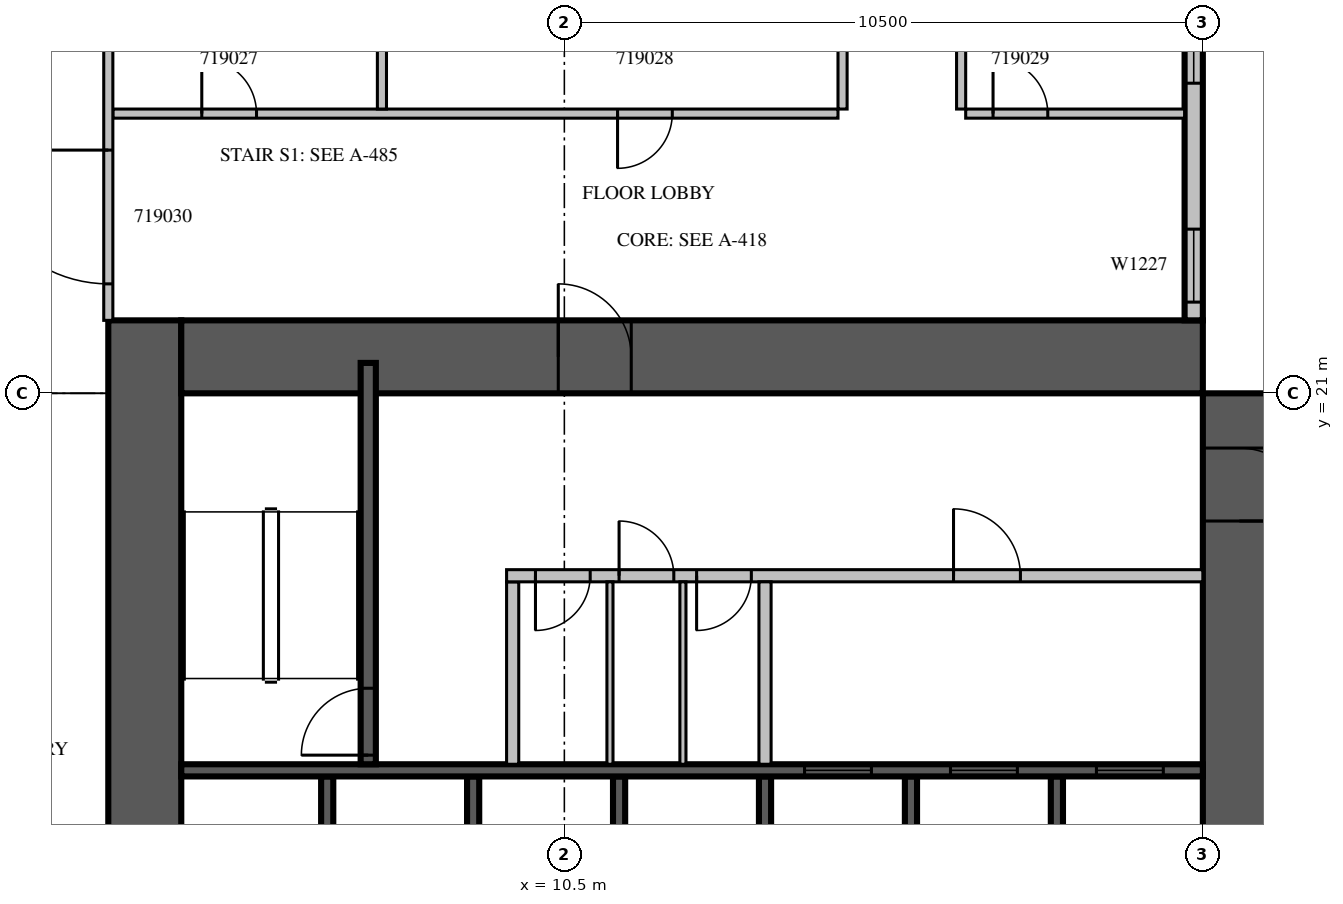
"""IFC4 building model, lengths in metres.
Left out: names, types, materials, properties, quantities, classifications, styles, units other than length and angle.
Written with IfcOpenShell. Run it as: python <this file> out.ifc"""

import sys

from ifc_helpers import new_model, si_unit, direction, frame, frame_2d, origin, place, context, subcontext, project, spatial, rectangle, extrude, source, transform, mapped, element, fill, save


model = new_model("IFC4")
c1 = context("Model", 3, precision=1e-05, world=origin(), true_north=direction((0.0, 1.0)))
c2 = subcontext(c1, "Body", "Model", "MODEL_VIEW")
j1 = project(units=[si_unit("LENGTHUNIT", "METRE"), si_unit("PLANEANGLEUNIT", "RADIAN")], contexts=[c1])
p1 = place(None, origin())
s1 = spatial("IfcSite", under=j1, at=p1, CompositionType="ELEMENT")
p2 = place(p1, origin())
s2 = spatial("IfcBuilding", under=s1, at=p2, CompositionType="ELEMENT")
p3 = place(p2, frame((0.0, 0.0, 90.9)))
s3 = spatial("IfcBuildingStorey", under=s2, at=p3, CompositionType="ELEMENT", Elevation=90.9)
m1 = source(origin(), c2, "Body", "SweptSolid", [
    extrude(rectangle(XDim=18.0, YDim=1.2, at=frame_2d((9.0, 0.0))), origin(), (0.0, 0.0, 1.0), 4.2),
])
p4 = place(p3, frame((3.6, 4.2, 0.0), z_axis=(0.0, 0.0, 1.0), x_axis=(0.0, 1.0, 0.0)))
e1 = element("IfcWall", 1, at=p4, inside=s3, PredefinedType="SHEAR", context=c2, shape_type="MappedRepresentation", body=[
    mapped(m1, transform((0.0, 0.0, 0.0), scale=1.0)),
])
m2 = source(origin(), c2, "Body", "SweptSolid", [
    extrude(rectangle(XDim=2.2, YDim=2.1, at=frame_2d((1.1, 1.05))), frame((0.0, 0.61, 0.0), z_axis=(0.0, -1.0, 0.0), x_axis=(1.0, 0.0, 0.0)), (0.0, 0.0, 1.0), 1.22),
])
p5 = place(p4, frame((4.2, 0.0, 0.0)))
e2 = element("IfcOpeningElement", 2, at=p5, cuts=e1, PredefinedType="OPENING", context=c2, shape_type="MappedRepresentation", body=[
    mapped(m2, transform((0.0, 0.0, 0.0), scale=1.0)),
])
m3 = source(origin(), c2, "Body", "SweptSolid", [
    extrude(rectangle(XDim=16.8, YDim=1.2, at=frame_2d((8.4, 0.0))), origin(), (0.0, 0.0, 1.0), 4.2),
])
p6 = place(p3, frame((21.6, 4.2, 0.0), z_axis=(0.0, 0.0, 1.0), x_axis=(0.0, 1.0, 0.0)))
e3 = element("IfcWall", 3, at=p6, inside=s3, PredefinedType="SHEAR", context=c2, shape_type="MappedRepresentation", body=[
    mapped(m3, transform((0.0, 0.0, 0.0), scale=1.0)),
])
p7 = place(p6, frame((4.2, 0.0, 0.0)))
e4 = element("IfcOpeningElement", 4, at=p7, cuts=e3, PredefinedType="OPENING", context=c2, shape_type="MappedRepresentation", body=[
    mapped(m2, transform((0.0, 0.0, 0.0), scale=1.0)),
])
m4 = source(origin(), c2, "Body", "SweptSolid", [
    extrude(rectangle(XDim=1.2, YDim=2.1, at=frame_2d((0.6, 1.05))), frame((0.0, 0.61, 0.0), z_axis=(0.0, -1.0, 0.0), x_axis=(1.0, 0.0, 0.0)), (0.0, 0.0, 1.0), 1.22),
])
p8 = place(p6, frame((14.7, 0.0, 0.0)))
e5 = element("IfcOpeningElement", 5, at=p8, cuts=e3, PredefinedType="OPENING", context=c2, shape_type="MappedRepresentation", body=[
    mapped(m4, transform((0.0, 0.0, 0.0), scale=1.0)),
])
p9 = place(p3, frame((4.2, 21.6, 0.0), z_axis=(0.0, 0.0, 1.0), x_axis=(1.0, 0.0, 0.0)))
e6 = element("IfcWall", 6, at=p9, inside=s3, PredefinedType="SHEAR", context=c2, shape_type="MappedRepresentation", body=[
    mapped(m3, transform((0.0, 0.0, 0.0), scale=1.0)),
])
p10 = place(p9, frame((6.2, 0.0, 0.0)))
e7 = element("IfcOpeningElement", 7, at=p10, cuts=e6, PredefinedType="OPENING", context=c2, shape_type="MappedRepresentation", body=[
    mapped(m4, transform((0.0, 0.0, 0.0), scale=1.0)),
])
m5 = source(origin(), c2, "Body", "SweptSolid", [
    extrude(rectangle(XDim=6.6, YDim=0.3, at=frame_2d((3.3, 0.0))), origin(), (0.0, 0.0, 1.0), 3.8),
])
p11 = place(p3, frame((20.85, 22.2, 0.0), z_axis=(0.0, 0.0, 1.0), x_axis=(0.0, 1.0, 0.0)))
e8 = element("IfcWall", 8, at=p11, inside=s3, PredefinedType="STANDARD", context=c2, shape_type="MappedRepresentation", body=[
    mapped(m5, transform((0.0, 0.0, 0.0), scale=1.0)),
])
m6 = source(origin(), c2, "Body", "SweptSolid", [
    extrude(rectangle(XDim=1.2, YDim=2.7, at=frame_2d((0.6, 1.35))), frame((0.0, 0.16, 0.0), z_axis=(0.0, -1.0, 0.0), x_axis=(1.0, 0.0, 0.0)), (0.0, 0.0, 1.0), 0.32),
])
p12 = place(p11, frame((0.3, 0.0, 0.6)))
e9 = element("IfcOpeningElement", 9, at=p12, cuts=e8, PredefinedType="OPENING", context=c2, shape_type="MappedRepresentation", body=[
    mapped(m6, transform((0.0, 0.0, 0.0), scale=1.0)),
])
m7 = source(origin(), c2, "Body", "SweptSolid", [
    extrude(rectangle(XDim=2.4, YDim=2.7, at=frame_2d((1.2, 1.35))), frame((0.0, 0.16, 0.0), z_axis=(0.0, -1.0, 0.0), x_axis=(1.0, 0.0, 0.0)), (0.0, 0.0, 1.0), 0.32),
])
p13 = place(p11, frame((3.9, 0.0, 0.6)))
e10 = element("IfcOpeningElement", 10, at=p13, cuts=e8, PredefinedType="OPENING", context=c2, shape_type="MappedRepresentation", body=[
    mapped(m7, transform((0.0, 0.0, 0.0), scale=1.0)),
])
m8 = source(origin(), c2, "Body", "SweptSolid", [
    extrude(rectangle(XDim=3.0, YDim=0.2, at=frame_2d((1.5, 0.0))), origin(), (0.0, 0.0, 1.0), 4.2),
])
for number, where, z_axis, x_axis in (
    (11, (6.6, 11.7, 0.0), (0.0, 0.0, 1.0), (0.0, 1.0, 0.0)),
    (12, (9.0, 11.7, 0.0), (0.0, 0.0, 1.0), (0.0, 1.0, 0.0)),
    (13, (11.4, 11.7, 0.0), (0.0, 0.0, 1.0), (0.0, 1.0, 0.0)),
    (14, (13.8, 11.7, 0.0), (0.0, 0.0, 1.0), (0.0, 1.0, 0.0)),
    (15, (16.2, 11.7, 0.0), (0.0, 0.0, 1.0), (0.0, 1.0, 0.0)),
    (16, (18.6, 11.7, 0.0), (0.0, 0.0, 1.0), (0.0, 1.0, 0.0)),
):
    element("IfcWall", number, at=place(p3, frame(where, z_axis=z_axis, x_axis=x_axis)), inside=s3, PredefinedType="SOLIDWALL", context=c2, shape_type="MappedRepresentation", body=[
        mapped(m8, transform((0.0, 0.0, 0.0), scale=1.0)),
    ])
m9 = source(origin(), c2, "Body", "SweptSolid", [
    extrude(rectangle(XDim=16.8, YDim=0.2, at=frame_2d((8.4, 0.0))), origin(), (0.0, 0.0, 1.0), 4.2),
])
p14 = place(p3, frame((4.2, 14.8, 0.0), z_axis=(0.0, 0.0, 1.0), x_axis=(1.0, 0.0, 0.0)))
e17 = element("IfcWall", 17, at=p14, inside=s3, PredefinedType="SOLIDWALL", context=c2, shape_type="MappedRepresentation", body=[
    mapped(m9, transform((0.0, 0.0, 0.0), scale=1.0)),
])
m10 = source(origin(), c2, "Body", "SweptSolid", [
    extrude(rectangle(XDim=1.1, YDim=2.1, at=frame_2d((0.55, 1.05))), frame((0.0, 0.11, 0.0), z_axis=(0.0, -1.0, 0.0), x_axis=(1.0, 0.0, 0.0)), (0.0, 0.0, 1.0), 0.22),
])
p15 = place(p14, frame((10.25, 0.0, 0.0)))
e18 = element("IfcOpeningElement", 18, at=p15, cuts=e17, PredefinedType="OPENING", context=c2, shape_type="MappedRepresentation", body=[
    mapped(m10, transform((0.0, 0.0, 0.0), scale=1.0)),
])
p16 = place(p14, frame((12.65, 0.0, 0.0)))
e19 = element("IfcOpeningElement", 19, at=p16, cuts=e17, PredefinedType="OPENING", context=c2, shape_type="MappedRepresentation", body=[
    mapped(m10, transform((0.0, 0.0, 0.0), scale=1.0)),
])
p17 = place(p14, frame((15.05, 0.0, 0.0)))
e20 = element("IfcOpeningElement", 20, at=p17, cuts=e17, PredefinedType="OPENING", context=c2, shape_type="MappedRepresentation", body=[
    mapped(m10, transform((0.0, 0.0, 0.0), scale=1.0)),
])
m11 = source(origin(), c2, "Body", "SweptSolid", [
    extrude(rectangle(XDim=6.6, YDim=0.25, at=frame_2d((3.3, 0.0))), origin(), (0.0, 0.0, 1.0), 3.8),
])
p18 = place(p3, frame((7.275, 14.9, 0.0), z_axis=(0.0, 0.0, 1.0), x_axis=(0.0, 1.0, 0.0)))
e21 = element("IfcWall", 21, at=p18, inside=s3, PredefinedType="SOLIDWALL", context=c2, shape_type="MappedRepresentation", body=[
    mapped(m11, transform((0.0, 0.0, 0.0), scale=1.0)),
])
m12 = source(origin(), c2, "Body", "SweptSolid", [
    extrude(rectangle(XDim=1.1, YDim=2.1, at=frame_2d((0.55, 1.05))), frame((0.0, 0.135, 0.0), z_axis=(0.0, -1.0, 0.0), x_axis=(1.0, 0.0, 0.0)), (0.0, 0.0, 1.0), 0.27),
])
p19 = place(p18, frame((0.15, 0.0, 0.0)))
e22 = element("IfcOpeningElement", 22, at=p19, cuts=e21, PredefinedType="OPENING", context=c2, shape_type="MappedRepresentation", body=[
    mapped(m12, transform((0.0, 0.0, 0.0), scale=1.0)),
])
m13 = source(origin(), c2, "Body", "SweptSolid", [
    extrude(rectangle(XDim=3.0, YDim=0.2, at=frame_2d((1.5, 0.0))), origin(), (0.0, 0.0, 1.0), 3.8),
])
p20 = place(p3, frame((9.65, 14.9, 0.0), z_axis=(0.0, 0.0, 1.0), x_axis=(0.0, 1.0, 0.0)))
e23 = element("IfcWall", 23, at=p20, inside=s3, PredefinedType="PARTITIONING", context=c2, shape_type="MappedRepresentation", body=[
    mapped(m13, transform((0.0, 0.0, 0.0), scale=1.0)),
])
m14 = source(origin(), c2, "Body", "SweptSolid", [
    extrude(rectangle(XDim=11.45, YDim=0.2, at=frame_2d((5.725, 0.0))), origin(), (0.0, 0.0, 1.0), 3.8),
])
p21 = place(p3, frame((9.55, 18.0, 0.0), z_axis=(0.0, 0.0, 1.0), x_axis=(1.0, 0.0, 0.0)))
e24 = element("IfcWall", 24, at=p21, inside=s3, PredefinedType="PARTITIONING", context=c2, shape_type="MappedRepresentation", body=[
    mapped(m14, transform((0.0, 0.0, 0.0), scale=1.0)),
])
m15 = source(origin(), c2, "Body", "SweptSolid", [
    extrude(rectangle(XDim=0.9, YDim=2.1, at=frame_2d((0.45, 1.05))), frame((0.0, 0.11, 0.0), z_axis=(0.0, -1.0, 0.0), x_axis=(1.0, 0.0, 0.0)), (0.0, 0.0, 1.0), 0.22),
])
p22 = place(p21, frame((0.475, 0.0, 0.0)))
e25 = element("IfcOpeningElement", 25, at=p22, cuts=e24, PredefinedType="OPENING", context=c2, shape_type="MappedRepresentation", body=[
    mapped(m15, transform((0.0, 0.0, 0.0), scale=1.0)),
])
p23 = place(p21, frame((1.85, 0.0, 0.0)))
e26 = element("IfcOpeningElement", 26, at=p23, cuts=e24, PredefinedType="OPENING", context=c2, shape_type="MappedRepresentation", body=[
    mapped(m15, transform((0.0, 0.0, 0.0), scale=1.0)),
])
p24 = place(p21, frame((3.125, 0.0, 0.0)))
e27 = element("IfcOpeningElement", 27, at=p24, cuts=e24, PredefinedType="OPENING", context=c2, shape_type="MappedRepresentation", body=[
    mapped(m15, transform((0.0, 0.0, 0.0), scale=1.0)),
])
p25 = place(p21, frame((7.35, 0.0, 0.0)))
e28 = element("IfcOpeningElement", 28, at=p25, cuts=e24, PredefinedType="OPENING", context=c2, shape_type="MappedRepresentation", body=[
    mapped(m10, transform((0.0, 0.0, 0.0), scale=1.0)),
])
p26 = place(p3, frame((13.8, 14.9, 0.0), z_axis=(0.0, 0.0, 1.0), x_axis=(0.0, 1.0, 0.0)))
e29 = element("IfcWall", 29, at=p26, inside=s3, PredefinedType="PARTITIONING", context=c2, shape_type="MappedRepresentation", body=[
    mapped(m13, transform((0.0, 0.0, 0.0), scale=1.0)),
])
m16 = source(origin(), c2, "Body", "SweptSolid", [
    extrude(rectangle(XDim=3.0, YDim=0.1, at=frame_2d((1.5, 0.0))), origin(), (0.0, 0.0, 1.0), 3.8),
])
for number, where, z_axis, x_axis in (
    (30, (11.25, 14.9, 0.0), (0.0, 0.0, 1.0), (0.0, 1.0, 0.0)),
    (31, (12.45, 14.9, 0.0), (0.0, 0.0, 1.0), (0.0, 1.0, 0.0)),
):
    element("IfcWall", number, at=place(p3, frame(where, z_axis=z_axis, x_axis=x_axis)), inside=s3, PredefinedType="PARTITIONING", context=c2, shape_type="MappedRepresentation", body=[
        mapped(m16, transform((0.0, 0.0, 0.0), scale=1.0)),
    ])
m17 = source(origin(), c2, "Body", "SweptSolid", [
    extrude(rectangle(XDim=11.925, YDim=0.15, at=frame_2d((5.963, 0.0))), origin(), (0.0, 0.0, 1.0), 3.8),
])
p27 = place(p3, frame((3.075, 25.6, 0.0), z_axis=(0.0, 0.0, 1.0), x_axis=(1.0, 0.0, 0.0)))
e32 = element("IfcWall", 32, at=p27, inside=s3, PredefinedType="PARTITIONING", context=c2, shape_type="MappedRepresentation", body=[
    mapped(m17, transform((0.0, 0.0, 0.0), scale=1.0)),
])
m18 = source(origin(), c2, "Body", "SweptSolid", [
    extrude(rectangle(XDim=0.9, YDim=2.1, at=frame_2d((0.45, 1.05))), frame((0.0, 0.085, 0.0), z_axis=(0.0, -1.0, 0.0), x_axis=(1.0, 0.0, 0.0)), (0.0, 0.0, 1.0), 0.17),
])
p28 = place(p27, frame((1.462, 0.0, 0.0)))
e33 = element("IfcOpeningElement", 33, at=p28, cuts=e32, PredefinedType="OPENING", context=c2, shape_type="MappedRepresentation", body=[
    mapped(m18, transform((0.0, 0.0, 0.0), scale=1.0)),
])
p29 = place(p27, frame((8.3, 0.0, 0.0)))
e34 = element("IfcOpeningElement", 34, at=p29, cuts=e32, PredefinedType="OPENING", context=c2, shape_type="MappedRepresentation", body=[
    mapped(m18, transform((0.0, 0.0, 0.0), scale=1.0)),
])
m19 = source(origin(), c2, "Body", "SweptSolid", [
    extrude(rectangle(XDim=3.6, YDim=0.15, at=frame_2d((1.8, 0.0))), origin(), (0.0, 0.0, 1.0), 3.8),
])
p30 = place(p3, frame((17.1, 25.6, 0.0), z_axis=(0.0, 0.0, 1.0), x_axis=(1.0, 0.0, 0.0)))
e35 = element("IfcWall", 35, at=p30, inside=s3, PredefinedType="PARTITIONING", context=c2, shape_type="MappedRepresentation", body=[
    mapped(m19, transform((0.0, 0.0, 0.0), scale=1.0)),
])
p31 = place(p30, frame((0.45, 0.0, 0.0)))
e36 = element("IfcOpeningElement", 36, at=p31, cuts=e35, PredefinedType="OPENING", context=c2, shape_type="MappedRepresentation", body=[
    mapped(m18, transform((0.0, 0.0, 0.0), scale=1.0)),
])
m20 = source(origin(), c2, "Body", "SweptSolid", [
    extrude(rectangle(XDim=3.65, YDim=0.15, at=frame_2d((1.825, 0.0))), origin(), (0.0, 0.0, 1.0), 3.8),
])
for number, where, z_axis, x_axis in (
    (37, (7.5, 25.675, 0.0), (0.0, 0.0, 1.0), (0.0, 1.0, 0.0)),
    (38, (15.075, 25.675, 0.0), (0.0, 0.0, 1.0), (0.0, 1.0, 0.0)),
    (39, (17.025, 29.325, 0.0), (0.0, 0.0, 1.0), (0.0, -1.0, 0.0)),
):
    element("IfcWall", number, at=place(p3, frame(where, z_axis=z_axis, x_axis=x_axis)), inside=s3, PredefinedType="PARTITIONING", context=c2, shape_type="MappedRepresentation", body=[
        mapped(m20, transform((0.0, 0.0, 0.0), scale=1.0)),
    ])
m21 = source(origin(), c2, "Body", "SweptSolid", [
    extrude(rectangle(XDim=7.125, YDim=0.15, at=frame_2d((3.562, 0.0))), origin(), (0.0, 0.0, 1.0), 3.8),
])
p32 = place(p3, frame((3.0, 29.325, 0.0), z_axis=(0.0, 0.0, 1.0), x_axis=(0.0, -1.0, 0.0)))
e40 = element("IfcWall", 40, at=p32, inside=s3, PredefinedType="PARTITIONING", context=c2, shape_type="MappedRepresentation", body=[
    mapped(m21, transform((0.0, 0.0, 0.0), scale=1.0)),
])
m22 = source(origin(), c2, "Body", "SweptSolid", [
    extrude(rectangle(XDim=2.2, YDim=2.1, at=frame_2d((1.1, 1.05))), frame((0.0, 0.085, 0.0), z_axis=(0.0, -1.0, 0.0), x_axis=(1.0, 0.0, 0.0)), (0.0, 0.0, 1.0), 0.17),
])
p33 = place(p32, frame((4.325, 0.0, 0.0)))
e41 = element("IfcOpeningElement", 41, at=p33, cuts=e40, PredefinedType="OPENING", context=c2, shape_type="MappedRepresentation", body=[
    mapped(m22, transform((0.0, 0.0, 0.0), scale=1.0)),
])
m23 = source(origin(), c2, "Body", "SweptSolid", [
    extrude(rectangle(XDim=1.2, YDim=2.7, at=frame_2d((0.6, 1.35))), frame((0.0, 0.03, 0.0), z_axis=(0.0, -1.0, 0.0), x_axis=(1.0, 0.0, 0.0)), (0.0, 0.0, 1.0), 0.06),
])
p34 = place(p12, origin())
e42 = element("IfcWindow", 42, at=p34, inside=s3, PartitioningType="SINGLE_PANEL", PredefinedType="WINDOW", context=c2, shape_type="MappedRepresentation", body=[
    mapped(m23, transform((0.0, 0.0, 0.0), scale=1.0)),
])
fill(e9, e42)
m24 = source(origin(), c2, "Body", "SweptSolid", [
    extrude(rectangle(XDim=2.4, YDim=2.7, at=frame_2d((1.2, 1.35))), frame((0.0, 0.03, 0.0), z_axis=(0.0, -1.0, 0.0), x_axis=(1.0, 0.0, 0.0)), (0.0, 0.0, 1.0), 0.06),
])
p35 = place(p13, origin())
e43 = element("IfcWindow", 43, at=p35, inside=s3, PartitioningType="SINGLE_PANEL", PredefinedType="WINDOW", context=c2, shape_type="MappedRepresentation", body=[
    mapped(m24, transform((0.0, 0.0, 0.0), scale=1.0)),
])
fill(e10, e43)
m25 = source(origin(), c2, "Body", "SweptSolid", [
    extrude(rectangle(XDim=1.1, YDim=2.1, at=frame_2d((0.55, 1.05))), frame((0.0, 0.025, 0.0), z_axis=(0.0, -1.0, 0.0), x_axis=(1.0, 0.0, 0.0)), (0.0, 0.0, 1.0), 0.05),
])
p36 = place(p15, origin())
e44 = element("IfcDoor", 44, at=p36, inside=s3, OperationType="SLIDING_TO_LEFT", PredefinedType="DOOR", context=c2, shape_type="MappedRepresentation", body=[
    mapped(m25, transform((0.0, 0.0, 0.0), scale=1.0)),
])
fill(e18, e44)
p37 = place(p16, origin())
e45 = element("IfcDoor", 45, at=p37, inside=s3, OperationType="SLIDING_TO_LEFT", PredefinedType="DOOR", context=c2, shape_type="MappedRepresentation", body=[
    mapped(m25, transform((0.0, 0.0, 0.0), scale=1.0)),
])
fill(e19, e45)
p38 = place(p17, origin())
e46 = element("IfcDoor", 46, at=p38, inside=s3, OperationType="SLIDING_TO_LEFT", PredefinedType="DOOR", context=c2, shape_type="MappedRepresentation", body=[
    mapped(m25, transform((0.0, 0.0, 0.0), scale=1.0)),
])
fill(e20, e46)
p39 = place(p19, origin())
e47 = element("IfcDoor", 47, at=p39, inside=s3, OperationType="SINGLE_SWING_LEFT", PredefinedType="DOOR", context=c2, shape_type="MappedRepresentation", body=[
    mapped(m25, transform((0.0, 0.0, 0.0), scale=1.0)),
])
fill(e22, e47)
m26 = source(origin(), c2, "Body", "SweptSolid", [
    extrude(rectangle(XDim=0.9, YDim=2.1, at=frame_2d((0.45, 1.05))), frame((0.0, 0.025, 0.0), z_axis=(0.0, -1.0, 0.0), x_axis=(1.0, 0.0, 0.0)), (0.0, 0.0, 1.0), 0.05),
])
p40 = place(p22, origin())
e48 = element("IfcDoor", 48, at=p40, inside=s3, OperationType="SINGLE_SWING_RIGHT", PredefinedType="DOOR", context=c2, shape_type="MappedRepresentation", body=[
    mapped(m26, transform((0.0, 0.0, 0.0), scale=1.0)),
])
fill(e25, e48)
p41 = place(p23, origin())
e49 = element("IfcDoor", 49, at=p41, inside=s3, OperationType="SINGLE_SWING_LEFT", PredefinedType="DOOR", context=c2, shape_type="MappedRepresentation", body=[
    mapped(m26, transform((0.0, 0.0, 0.0), scale=1.0)),
])
fill(e26, e49)
p42 = place(p24, origin())
e50 = element("IfcDoor", 50, at=p42, inside=s3, OperationType="SINGLE_SWING_RIGHT", PredefinedType="DOOR", context=c2, shape_type="MappedRepresentation", body=[
    mapped(m26, transform((0.0, 0.0, 0.0), scale=1.0)),
])
fill(e27, e50)
p43 = place(p25, origin())
e51 = element("IfcDoor", 51, at=p43, inside=s3, OperationType="SINGLE_SWING_LEFT", PredefinedType="DOOR", context=c2, shape_type="MappedRepresentation", body=[
    mapped(m25, transform((0.0, 0.0, 0.0), scale=1.0)),
])
fill(e28, e51)
m27 = source(origin(), c2, "Body", "SweptSolid", [
    extrude(rectangle(XDim=1.2, YDim=2.1, at=frame_2d((0.6, 1.05))), frame((0.0, 0.025, 0.0), z_axis=(0.0, -1.0, 0.0), x_axis=(1.0, 0.0, 0.0)), (0.0, 0.0, 1.0), 0.05),
])
p44 = place(p10, origin())
e52 = element("IfcDoor", 52, at=p44, inside=s3, OperationType="SINGLE_SWING_LEFT", PredefinedType="DOOR", context=c2, shape_type="MappedRepresentation", body=[
    mapped(m27, transform((0.0, 0.0, 0.0), scale=1.0)),
])
fill(e7, e52)
p45 = place(p8, origin())
e53 = element("IfcDoor", 53, at=p45, inside=s3, OperationType="SINGLE_SWING_RIGHT", PredefinedType="DOOR", context=c2, shape_type="MappedRepresentation", body=[
    mapped(m27, transform((0.0, 0.0, 0.0), scale=1.0)),
])
fill(e5, e53)
p46 = place(p28, origin())
e54 = element("IfcDoor", 54, at=p46, inside=s3, OperationType="SINGLE_SWING_LEFT", PredefinedType="DOOR", context=c2, shape_type="MappedRepresentation", body=[
    mapped(m26, transform((0.0, 0.0, 0.0), scale=1.0)),
])
fill(e33, e54)
p47 = place(p29, origin())
e55 = element("IfcDoor", 55, at=p47, inside=s3, OperationType="SINGLE_SWING_RIGHT", PredefinedType="DOOR", context=c2, shape_type="MappedRepresentation", body=[
    mapped(m26, transform((0.0, 0.0, 0.0), scale=1.0)),
])
fill(e34, e55)
p48 = place(p31, origin())
e56 = element("IfcDoor", 56, at=p48, inside=s3, OperationType="SINGLE_SWING_LEFT", PredefinedType="DOOR", context=c2, shape_type="MappedRepresentation", body=[
    mapped(m26, transform((0.0, 0.0, 0.0), scale=1.0)),
])
fill(e36, e56)
m28 = source(origin(), c2, "Body", "SweptSolid", [
    extrude(rectangle(XDim=2.2, YDim=2.1, at=frame_2d((1.1, 1.05))), frame((0.0, 0.025, 0.0), z_axis=(0.0, -1.0, 0.0), x_axis=(1.0, 0.0, 0.0)), (0.0, 0.0, 1.0), 0.05),
])
p49 = place(p33, origin())
e57 = element("IfcDoor", 57, at=p49, inside=s3, OperationType="DOUBLE_DOOR_SINGLE_SWING", PredefinedType="DOOR", context=c2, shape_type="MappedRepresentation", body=[
    mapped(m28, transform((0.0, 0.0, 0.0), scale=1.0)),
])
fill(e41, e57)
save(model, sys.argv[1])
